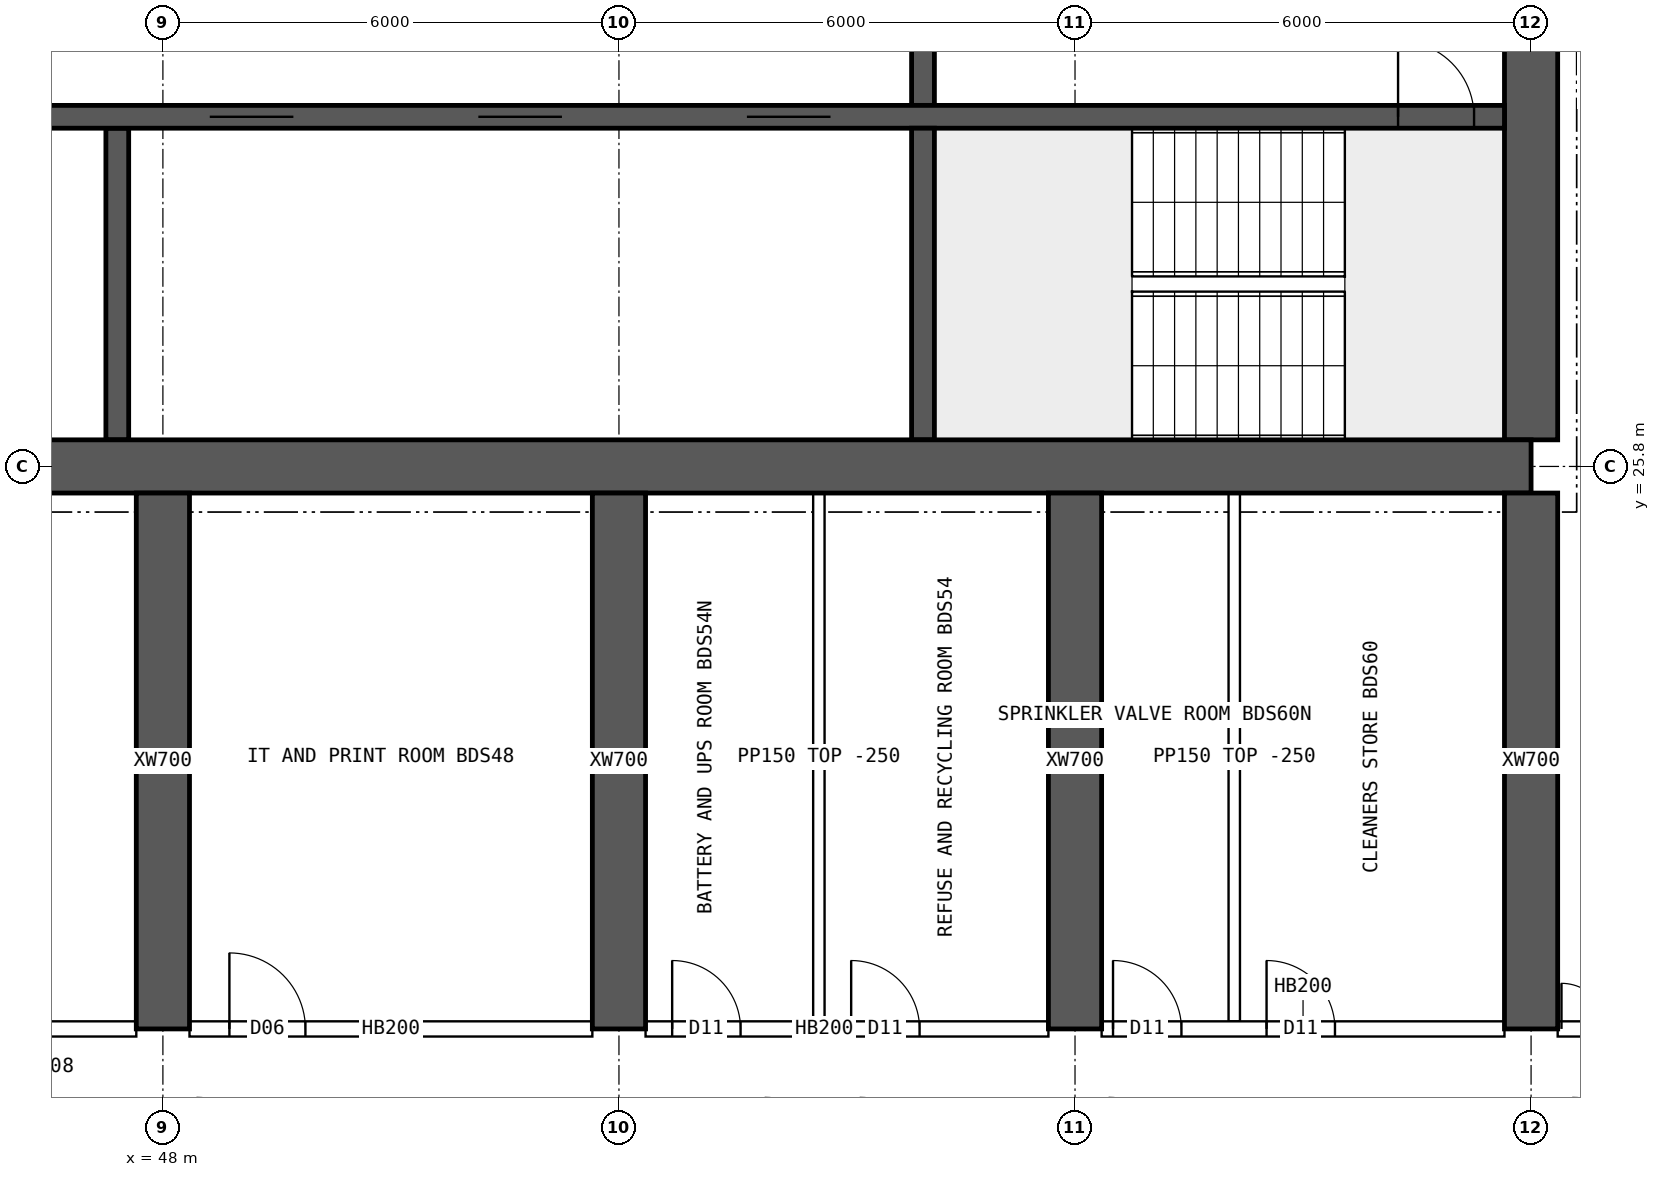
"""IFC4 building model, lengths in metres.
Left out: names, types, materials, properties, quantities, classifications, styles, units other than length and angle.
Written with IfcOpenShell. Run it as: python <this file> out.ifc"""

import sys

from ifc_helpers import new_model, si_unit, direction, frame, frame_2d, origin, place, context, subcontext, project, spatial, rectangle, extrude, element, fill, save


model = new_model("IFC4")
c1 = context("Model", 3, precision=1e-05, world=origin(), true_north=direction((0.0, 1.0)))
c2 = subcontext(c1, "Body", "Model", "MODEL_VIEW")
j1 = project(units=[si_unit("LENGTHUNIT", "METRE"), si_unit("PLANEANGLEUNIT", "RADIAN")], contexts=[c1])
p1 = place(None, origin())
s1 = spatial("IfcSite", under=j1, at=p1, CompositionType="ELEMENT")
p2 = place(p1, origin())
s2 = spatial("IfcBuilding", under=s1, at=p2, CompositionType="ELEMENT")
p3 = place(p2, frame((0.0, 0.0, 216.55)))
s3 = spatial("IfcBuildingStorey", under=s2, at=p3, CompositionType="ELEMENT", Elevation=216.55)
p4 = place(p3, frame((18.0, 25.8, 0.0), z_axis=(0.0, 0.0, 1.0), x_axis=(1.0, 0.0, 0.0)))
e1 = element("IfcWall", 1, at=p4, inside=s3, PredefinedType="SHEAR", context=c2, shape_type="SweptSolid", body=[
    extrude(rectangle(XDim=48.0, YDim=0.7, at=frame_2d((24.0, 0.0))), origin(), (0.0, 0.0, 1.0), 3.75),
])
p5 = place(p3, frame((66.0, 26.15, 0.0), z_axis=(0.0, 0.0, 1.0), x_axis=(0.0, 1.0, 0.0)))
e2 = element("IfcWall", 2, at=p5, inside=s3, PredefinedType="SHEAR", context=c2, shape_type="SweptSolid", body=[
    extrude(rectangle(XDim=11.7, YDim=0.7, at=frame_2d((5.85, 0.0))), origin(), (0.0, 0.0, 1.0), 3.75),
])
p6 = place(p5, frame((5.15, 0.0, 0.0)))
e3 = element("IfcOpeningElement", 3, at=p6, cuts=e2, PredefinedType="OPENING", context=c2, shape_type="SweptSolid", body=[
    extrude(rectangle(XDim=1.2, YDim=2.1, at=frame_2d((0.6, 1.05))), frame((0.0, 0.36, 0.0), z_axis=(0.0, -1.0, 0.0), x_axis=(1.0, 0.0, 0.0)), (0.0, 0.0, 1.0), 0.72),
])
p7 = place(p3, frame((18.35, 30.4, 0.0), z_axis=(0.0, 0.0, 1.0), x_axis=(1.0, 0.0, 0.0)))
e4 = element("IfcWall", 4, at=p7, inside=s3, PredefinedType="SHEAR", context=c2, shape_type="SweptSolid", body=[
    extrude(rectangle(XDim=47.3, YDim=0.3, at=frame_2d((23.65, 0.0))), origin(), (0.0, 0.0, 1.0), 3.75),
])
p8 = place(p7, frame((0.4, 0.0, 0.0)))
e5 = element("IfcOpeningElement", 5, at=p8, cuts=e4, PredefinedType="OPENING", context=c2, shape_type="SweptSolid", body=[
    extrude(rectangle(XDim=1.0, YDim=2.1, at=frame_2d((0.5, 1.05))), frame((0.0, 0.16, 0.0), z_axis=(0.0, -1.0, 0.0), x_axis=(1.0, 0.0, 0.0)), (0.0, 0.0, 1.0), 0.32),
])
p9 = place(p7, frame((45.9, 0.0, 0.0)))
e6 = element("IfcOpeningElement", 6, at=p9, cuts=e4, PredefinedType="OPENING", context=c2, shape_type="SweptSolid", body=[
    extrude(rectangle(XDim=1.0, YDim=2.1, at=frame_2d((0.5, 1.05))), frame((0.0, 0.16, 0.0), z_axis=(0.0, -1.0, 0.0), x_axis=(1.0, 0.0, 0.0)), (0.0, 0.0, 1.0), 0.32),
])
p10 = place(p7, frame((8.4, 0.0, 0.0)))
e7 = element("IfcOpeningElement", 7, at=p10, cuts=e4, PredefinedType="OPENING", context=c2, shape_type="SweptSolid", body=[
    extrude(rectangle(XDim=1.1, YDim=2.1, at=frame_2d((0.55, 1.05))), frame((0.0, 0.16, 0.0), z_axis=(0.0, -1.0, 0.0), x_axis=(1.0, 0.0, 0.0)), (0.0, 0.0, 1.0), 0.32),
])
p11 = place(p7, frame((11.0, 0.0, 0.0)))
e8 = element("IfcOpeningElement", 8, at=p11, cuts=e4, PredefinedType="OPENING", context=c2, shape_type="SweptSolid", body=[
    extrude(rectangle(XDim=1.1, YDim=2.1, at=frame_2d((0.55, 1.05))), frame((0.0, 0.16, 0.0), z_axis=(0.0, -1.0, 0.0), x_axis=(1.0, 0.0, 0.0)), (0.0, 0.0, 1.0), 0.32),
])
p12 = place(p7, frame((13.6, 0.0, 0.0)))
e9 = element("IfcOpeningElement", 9, at=p12, cuts=e4, PredefinedType="OPENING", context=c2, shape_type="SweptSolid", body=[
    extrude(rectangle(XDim=1.1, YDim=2.1, at=frame_2d((0.55, 1.05))), frame((0.0, 0.16, 0.0), z_axis=(0.0, -1.0, 0.0), x_axis=(1.0, 0.0, 0.0)), (0.0, 0.0, 1.0), 0.32),
])
p13 = place(p7, frame((16.2, 0.0, 0.0)))
e10 = element("IfcOpeningElement", 10, at=p13, cuts=e4, PredefinedType="OPENING", context=c2, shape_type="SweptSolid", body=[
    extrude(rectangle(XDim=1.1, YDim=2.1, at=frame_2d((0.55, 1.05))), frame((0.0, 0.16, 0.0), z_axis=(0.0, -1.0, 0.0), x_axis=(1.0, 0.0, 0.0)), (0.0, 0.0, 1.0), 0.32),
])
p14 = place(p7, frame((18.975, 0.0, 0.0)))
e11 = element("IfcOpeningElement", 11, at=p14, cuts=e4, PredefinedType="OPENING", context=c2, shape_type="SweptSolid", body=[
    extrude(rectangle(XDim=0.9, YDim=2.1, at=frame_2d((0.45, 1.05))), frame((0.0, 0.16, 0.0), z_axis=(0.0, -1.0, 0.0), x_axis=(1.0, 0.0, 0.0)), (0.0, 0.0, 1.0), 0.32),
])
p15 = place(p7, frame((24.475, 0.0, 0.0)))
e12 = element("IfcOpeningElement", 12, at=p15, cuts=e4, PredefinedType="OPENING", context=c2, shape_type="SweptSolid", body=[
    extrude(rectangle(XDim=0.9, YDim=2.1, at=frame_2d((0.45, 1.05))), frame((0.0, 0.16, 0.0), z_axis=(0.0, -1.0, 0.0), x_axis=(1.0, 0.0, 0.0)), (0.0, 0.0, 1.0), 0.32),
])
p16 = place(p7, frame((30.267, 0.0, 0.0)))
e13 = element("IfcOpeningElement", 13, at=p16, cuts=e4, PredefinedType="OPENING", context=c2, shape_type="SweptSolid", body=[
    extrude(rectangle(XDim=1.1, YDim=2.1, at=frame_2d((0.55, 1.05))), frame((0.0, 0.16, 0.0), z_axis=(0.0, -1.0, 0.0), x_axis=(1.0, 0.0, 0.0)), (0.0, 0.0, 1.0), 0.32),
])
p17 = place(p7, frame((33.8, 0.0, 0.0)))
e14 = element("IfcOpeningElement", 14, at=p17, cuts=e4, PredefinedType="OPENING", context=c2, shape_type="SweptSolid", body=[
    extrude(rectangle(XDim=1.1, YDim=2.1, at=frame_2d((0.55, 1.05))), frame((0.0, 0.16, 0.0), z_axis=(0.0, -1.0, 0.0), x_axis=(1.0, 0.0, 0.0)), (0.0, 0.0, 1.0), 0.32),
])
p18 = place(p7, frame((37.333, 0.0, 0.0)))
e15 = element("IfcOpeningElement", 15, at=p18, cuts=e4, PredefinedType="OPENING", context=c2, shape_type="SweptSolid", body=[
    extrude(rectangle(XDim=1.1, YDim=2.1, at=frame_2d((0.55, 1.05))), frame((0.0, 0.16, 0.0), z_axis=(0.0, -1.0, 0.0), x_axis=(1.0, 0.0, 0.0)), (0.0, 0.0, 1.0), 0.32),
])
p19 = place(p3, frame((58.0, 26.15, 0.0), z_axis=(0.0, 0.0, 1.0), x_axis=(0.0, 1.0, 0.0)))
e16 = element("IfcWall", 16, at=p19, inside=s3, PredefinedType="SHEAR", context=c2, shape_type="SweptSolid", body=[
    extrude(rectangle(XDim=4.1, YDim=0.3, at=frame_2d((2.05, 0.0))), origin(), (0.0, 0.0, 1.0), 3.75),
])
p20 = place(p3, frame((58.0, 30.55, 0.0), z_axis=(0.0, 0.0, 1.0), x_axis=(0.0, 1.0, 0.0)))
e17 = element("IfcWall", 17, at=p20, inside=s3, PredefinedType="SHEAR", context=c2, shape_type="SweptSolid", body=[
    extrude(rectangle(XDim=3.9, YDim=0.3, at=frame_2d((1.95, 0.0))), origin(), (0.0, 0.0, 1.0), 3.75),
])
p21 = place(p20, frame((1.4, 0.0, 0.0)))
e18 = element("IfcOpeningElement", 18, at=p21, cuts=e17, PredefinedType="OPENING", context=c2, shape_type="SweptSolid", body=[
    extrude(rectangle(XDim=1.2, YDim=2.1, at=frame_2d((0.6, 1.05))), frame((0.0, 0.16, 0.0), z_axis=(0.0, -1.0, 0.0), x_axis=(1.0, 0.0, 0.0)), (0.0, 0.0, 1.0), 0.32),
])
p22 = place(p3, frame((47.4, 26.15, 0.0), z_axis=(0.0, 0.0, 1.0), x_axis=(0.0, 1.0, 0.0)))
e19 = element("IfcWall", 19, at=p22, inside=s3, PredefinedType="SHEAR", context=c2, shape_type="SweptSolid", body=[
    extrude(rectangle(XDim=4.1, YDim=0.3, at=frame_2d((2.05, 0.0))), origin(), (0.0, 0.0, 1.0), 3.75),
])
for number, where, z_axis, x_axis in (
    (20, (48.0, 18.4, 0.0), (0.0, 0.0, 1.0), (0.0, 1.0, 0.0)),
    (21, (54.0, 18.4, 0.0), (0.0, 0.0, 1.0), (0.0, 1.0, 0.0)),
    (22, (60.0, 18.4, 0.0), (0.0, 0.0, 1.0), (0.0, 1.0, 0.0)),
    (23, (66.0, 18.4, 0.0), (0.0, 0.0, 1.0), (0.0, 1.0, 0.0)),
):
    element("IfcWall", number, at=place(p3, frame(where, z_axis=z_axis, x_axis=x_axis)), inside=s3, PredefinedType="SHEAR", context=c2, shape_type="SweptSolid", body=[
        extrude(rectangle(XDim=7.05, YDim=0.7, at=frame_2d((3.525, 0.0))), origin(), (0.0, 0.0, 1.0), 3.75),
    ])
p23 = place(p3, frame((42.35, 18.4, 0.0), z_axis=(0.0, 0.0, 1.0), x_axis=(1.0, 0.0, 0.0)))
e24 = element("IfcWall", 24, at=p23, inside=s3, PredefinedType="SOLIDWALL", context=c2, shape_type="SweptSolid", body=[
    extrude(rectangle(XDim=5.3, YDim=0.2, at=frame_2d((2.65, 0.0))), origin(), (0.0, 0.0, 1.0), 3.5),
])
p24 = place(p23, frame((0.35, 0.0, 0.0)))
e25 = element("IfcOpeningElement", 25, at=p24, cuts=e24, PredefinedType="OPENING", context=c2, shape_type="SweptSolid", body=[
    extrude(rectangle(XDim=0.9, YDim=2.1, at=frame_2d((0.45, 1.05))), frame((0.0, 0.11, 0.0), z_axis=(0.0, -1.0, 0.0), x_axis=(1.0, 0.0, 0.0)), (0.0, 0.0, 1.0), 0.22),
])
p25 = place(p23, frame((2.535, 0.0, 0.0)))
e26 = element("IfcOpeningElement", 26, at=p25, cuts=e24, PredefinedType="OPENING", context=c2, shape_type="SweptSolid", body=[
    extrude(rectangle(XDim=0.9, YDim=2.1, at=frame_2d((0.45, 1.05))), frame((0.0, 0.11, 0.0), z_axis=(0.0, -1.0, 0.0), x_axis=(1.0, 0.0, 0.0)), (0.0, 0.0, 1.0), 0.22),
])
p26 = place(p3, frame((48.35, 18.4, 0.0), z_axis=(0.0, 0.0, 1.0), x_axis=(1.0, 0.0, 0.0)))
e27 = element("IfcWall", 27, at=p26, inside=s3, PredefinedType="SOLIDWALL", context=c2, shape_type="SweptSolid", body=[
    extrude(rectangle(XDim=5.3, YDim=0.2, at=frame_2d((2.65, 0.0))), origin(), (0.0, 0.0, 1.0), 3.5),
])
p27 = place(p26, frame((0.525, 0.0, 0.0)))
e28 = element("IfcOpeningElement", 28, at=p27, cuts=e27, PredefinedType="OPENING", context=c2, shape_type="SweptSolid", body=[
    extrude(rectangle(XDim=1.0, YDim=2.1, at=frame_2d((0.5, 1.05))), frame((0.0, 0.11, 0.0), z_axis=(0.0, -1.0, 0.0), x_axis=(1.0, 0.0, 0.0)), (0.0, 0.0, 1.0), 0.22),
])
p28 = place(p3, frame((54.35, 18.4, 0.0), z_axis=(0.0, 0.0, 1.0), x_axis=(1.0, 0.0, 0.0)))
e29 = element("IfcWall", 29, at=p28, inside=s3, PredefinedType="SOLIDWALL", context=c2, shape_type="SweptSolid", body=[
    extrude(rectangle(XDim=5.3, YDim=0.2, at=frame_2d((2.65, 0.0))), origin(), (0.0, 0.0, 1.0), 3.5),
])
p29 = place(p28, frame((0.35, 0.0, 0.0)))
e30 = element("IfcOpeningElement", 30, at=p29, cuts=e29, PredefinedType="OPENING", context=c2, shape_type="SweptSolid", body=[
    extrude(rectangle(XDim=0.9, YDim=2.1, at=frame_2d((0.45, 1.05))), frame((0.0, 0.11, 0.0), z_axis=(0.0, -1.0, 0.0), x_axis=(1.0, 0.0, 0.0)), (0.0, 0.0, 1.0), 0.22),
])
p30 = place(p28, frame((2.705, 0.0, 0.0)))
e31 = element("IfcOpeningElement", 31, at=p30, cuts=e29, PredefinedType="OPENING", context=c2, shape_type="SweptSolid", body=[
    extrude(rectangle(XDim=0.9, YDim=2.1, at=frame_2d((0.45, 1.05))), frame((0.0, 0.11, 0.0), z_axis=(0.0, -1.0, 0.0), x_axis=(1.0, 0.0, 0.0)), (0.0, 0.0, 1.0), 0.22),
])
p31 = place(p3, frame((60.35, 18.4, 0.0), z_axis=(0.0, 0.0, 1.0), x_axis=(1.0, 0.0, 0.0)))
e32 = element("IfcWall", 32, at=p31, inside=s3, PredefinedType="SOLIDWALL", context=c2, shape_type="SweptSolid", body=[
    extrude(rectangle(XDim=5.3, YDim=0.2, at=frame_2d((2.65, 0.0))), origin(), (0.0, 0.0, 1.0), 3.5),
])
p32 = place(p31, frame((0.15, 0.0, 0.0)))
e33 = element("IfcOpeningElement", 33, at=p32, cuts=e32, PredefinedType="OPENING", context=c2, shape_type="SweptSolid", body=[
    extrude(rectangle(XDim=0.9, YDim=2.1, at=frame_2d((0.45, 1.05))), frame((0.0, 0.11, 0.0), z_axis=(0.0, -1.0, 0.0), x_axis=(1.0, 0.0, 0.0)), (0.0, 0.0, 1.0), 0.22),
])
p33 = place(p31, frame((2.17, 0.0, 0.0)))
e34 = element("IfcOpeningElement", 34, at=p33, cuts=e32, PredefinedType="OPENING", context=c2, shape_type="SweptSolid", body=[
    extrude(rectangle(XDim=0.9, YDim=2.1, at=frame_2d((0.45, 1.05))), frame((0.0, 0.11, 0.0), z_axis=(0.0, -1.0, 0.0), x_axis=(1.0, 0.0, 0.0)), (0.0, 0.0, 1.0), 0.22),
])
p34 = place(p3, frame((66.35, 18.4, 0.0), z_axis=(0.0, 0.0, 1.0), x_axis=(1.0, 0.0, 0.0)))
e35 = element("IfcWall", 35, at=p34, inside=s3, PredefinedType="SOLIDWALL", context=c2, shape_type="SweptSolid", body=[
    extrude(rectangle(XDim=2.05, YDim=0.2, at=frame_2d((1.025, 0.0))), origin(), (0.0, 0.0, 1.0), 3.5),
])
p35 = place(p34, frame((0.05, 0.0, 0.0)))
e36 = element("IfcOpeningElement", 36, at=p35, cuts=e35, PredefinedType="OPENING", context=c2, shape_type="SweptSolid", body=[
    extrude(rectangle(XDim=1.2, YDim=2.1, at=frame_2d((0.6, 1.05))), frame((0.0, 0.11, 0.0), z_axis=(0.0, -1.0, 0.0), x_axis=(1.0, 0.0, 0.0)), (0.0, 0.0, 1.0), 0.22),
])
for number, where, z_axis, x_axis in (
    (37, (56.63, 18.5, 0.0), (0.0, 0.0, 1.0), (0.0, 1.0, 0.0)),
    (38, (62.095, 18.5, 0.0), (0.0, 0.0, 1.0), (0.0, 1.0, 0.0)),
):
    element("IfcWall", number, at=place(p3, frame(where, z_axis=z_axis, x_axis=x_axis)), inside=s3, PredefinedType="PARTITIONING", context=c2, shape_type="SweptSolid", body=[
        extrude(rectangle(XDim=6.95, YDim=0.15, at=frame_2d((3.475, 0.0))), origin(), (0.0, 0.0, 1.0), 3.5),
    ])
p36 = place(p9, origin())
e39 = element("IfcDoor", 39, at=p36, inside=s3, OperationType="SINGLE_SWING_LEFT", PredefinedType="DOOR", context=c2, shape_type="SweptSolid", body=[
    extrude(rectangle(XDim=1.0, YDim=2.1, at=frame_2d((0.5, 1.05))), frame((0.0, 0.025, 0.0), z_axis=(0.0, -1.0, 0.0), x_axis=(1.0, 0.0, 0.0)), (0.0, 0.0, 1.0), 0.05),
])
fill(e6, e39)
p37 = place(p16, origin())
e40 = element("IfcDoor", 40, at=p37, inside=s3, OperationType="DOUBLE_DOOR_SLIDING", PredefinedType="DOOR", context=c2, shape_type="SweptSolid", body=[
    extrude(rectangle(XDim=1.1, YDim=2.1, at=frame_2d((0.55, 1.05))), frame((0.0, 0.025, 0.0), z_axis=(0.0, -1.0, 0.0), x_axis=(1.0, 0.0, 0.0)), (0.0, 0.0, 1.0), 0.05),
])
fill(e13, e40)
p38 = place(p17, origin())
e41 = element("IfcDoor", 41, at=p38, inside=s3, OperationType="DOUBLE_DOOR_SLIDING", PredefinedType="DOOR", context=c2, shape_type="SweptSolid", body=[
    extrude(rectangle(XDim=1.1, YDim=2.1, at=frame_2d((0.55, 1.05))), frame((0.0, 0.025, 0.0), z_axis=(0.0, -1.0, 0.0), x_axis=(1.0, 0.0, 0.0)), (0.0, 0.0, 1.0), 0.05),
])
fill(e14, e41)
p39 = place(p18, origin())
e42 = element("IfcDoor", 42, at=p39, inside=s3, OperationType="DOUBLE_DOOR_SLIDING", PredefinedType="DOOR", context=c2, shape_type="SweptSolid", body=[
    extrude(rectangle(XDim=1.1, YDim=2.1, at=frame_2d((0.55, 1.05))), frame((0.0, 0.025, 0.0), z_axis=(0.0, -1.0, 0.0), x_axis=(1.0, 0.0, 0.0)), (0.0, 0.0, 1.0), 0.05),
])
fill(e15, e42)
p40 = place(p35, origin())
e43 = element("IfcDoor", 43, at=p40, inside=s3, OperationType="DOUBLE_DOOR_SINGLE_SWING", PredefinedType="DOOR", context=c2, shape_type="SweptSolid", body=[
    extrude(rectangle(XDim=1.2, YDim=2.1, at=frame_2d((0.6, 1.05))), frame((0.0, 0.025, 0.0), z_axis=(0.0, -1.0, 0.0), x_axis=(1.0, 0.0, 0.0)), (0.0, 0.0, 1.0), 0.05),
])
fill(e36, e43)
p41 = place(p27, origin())
e44 = element("IfcDoor", 44, at=p41, inside=s3, OperationType="SINGLE_SWING_LEFT", PredefinedType="DOOR", context=c2, shape_type="SweptSolid", body=[
    extrude(rectangle(XDim=1.0, YDim=2.1, at=frame_2d((0.5, 1.05))), frame((0.0, 0.025, 0.0), z_axis=(0.0, -1.0, 0.0), x_axis=(1.0, 0.0, 0.0)), (0.0, 0.0, 1.0), 0.05),
])
fill(e28, e44)
p42 = place(p29, origin())
e45 = element("IfcDoor", 45, at=p42, inside=s3, OperationType="SINGLE_SWING_LEFT", PredefinedType="DOOR", context=c2, shape_type="SweptSolid", body=[
    extrude(rectangle(XDim=0.9, YDim=2.1, at=frame_2d((0.45, 1.05))), frame((0.0, 0.025, 0.0), z_axis=(0.0, -1.0, 0.0), x_axis=(1.0, 0.0, 0.0)), (0.0, 0.0, 1.0), 0.05),
])
fill(e30, e45)
p43 = place(p30, origin())
e46 = element("IfcDoor", 46, at=p43, inside=s3, OperationType="SINGLE_SWING_LEFT", PredefinedType="DOOR", context=c2, shape_type="SweptSolid", body=[
    extrude(rectangle(XDim=0.9, YDim=2.1, at=frame_2d((0.45, 1.05))), frame((0.0, 0.025, 0.0), z_axis=(0.0, -1.0, 0.0), x_axis=(1.0, 0.0, 0.0)), (0.0, 0.0, 1.0), 0.05),
])
fill(e31, e46)
p44 = place(p32, origin())
e47 = element("IfcDoor", 47, at=p44, inside=s3, OperationType="SINGLE_SWING_LEFT", PredefinedType="DOOR", context=c2, shape_type="SweptSolid", body=[
    extrude(rectangle(XDim=0.9, YDim=2.1, at=frame_2d((0.45, 1.05))), frame((0.0, 0.025, 0.0), z_axis=(0.0, -1.0, 0.0), x_axis=(1.0, 0.0, 0.0)), (0.0, 0.0, 1.0), 0.05),
])
fill(e33, e47)
p45 = place(p33, origin())
e48 = element("IfcDoor", 48, at=p45, inside=s3, OperationType="SINGLE_SWING_LEFT", PredefinedType="DOOR", context=c2, shape_type="SweptSolid", body=[
    extrude(rectangle(XDim=0.9, YDim=2.1, at=frame_2d((0.45, 1.05))), frame((0.0, 0.025, 0.0), z_axis=(0.0, -1.0, 0.0), x_axis=(1.0, 0.0, 0.0)), (0.0, 0.0, 1.0), 0.05),
])
fill(e34, e48)
save(model, sys.argv[1])
